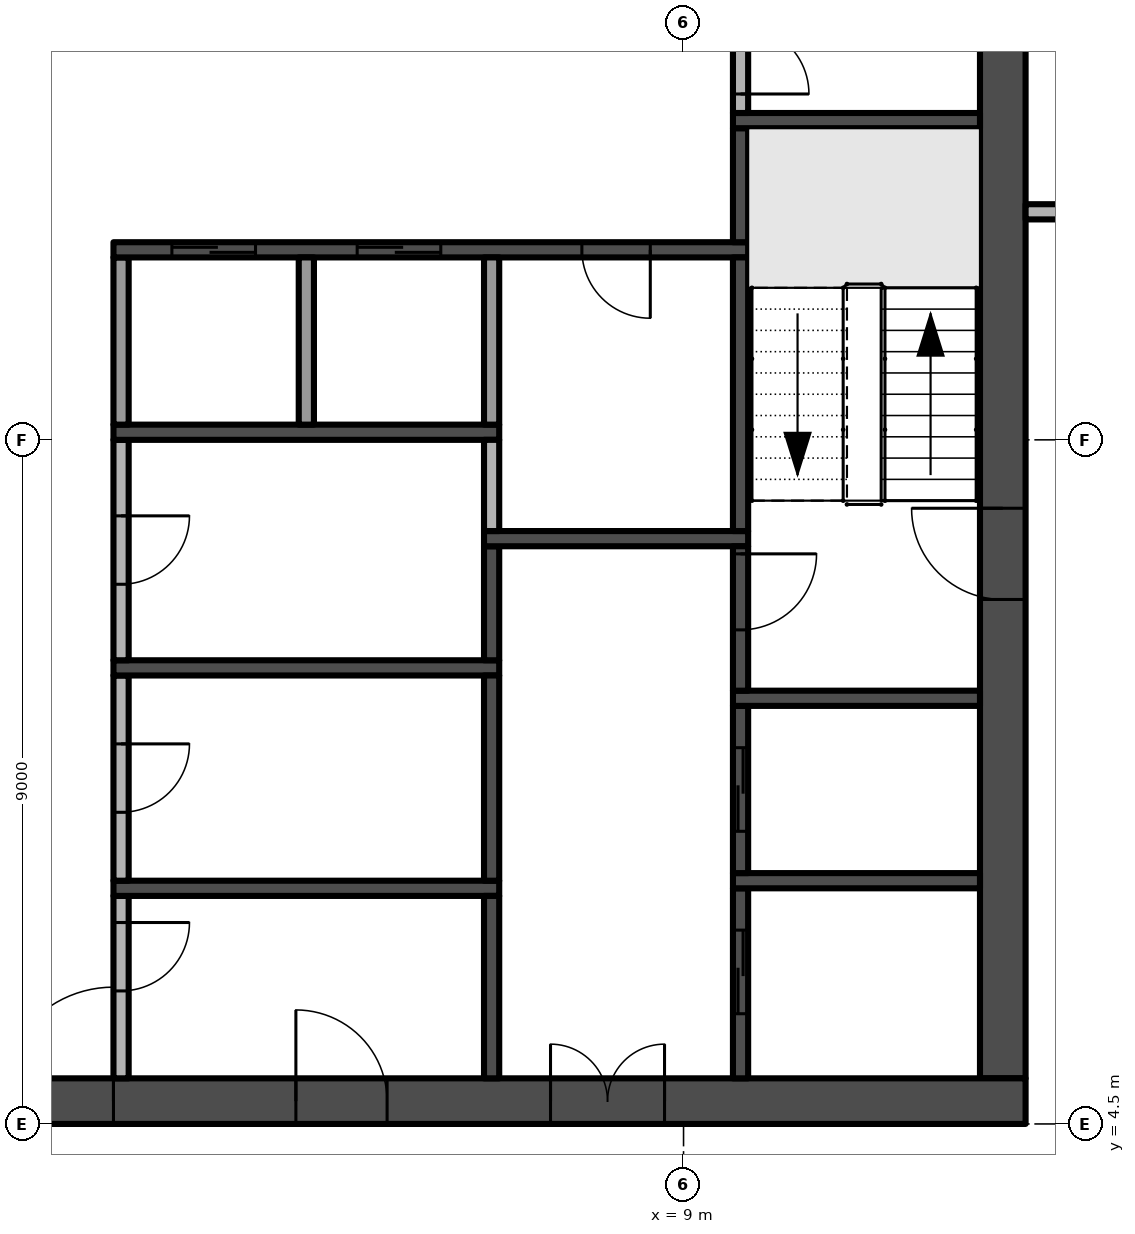
"""IFC4 building model, lengths in metres.
Left out: names, types, materials, properties, quantities, classifications, styles, units other than length and angle.
Written with IfcOpenShell. Run it as: python <this file> out.ifc"""

import sys

from ifc_helpers import new_model, si_unit, direction, frame, frame_2d, origin, place, context, subcontext, project, spatial, rectangle, extrude, element, fill, save


model = new_model("IFC4")
c1 = context("Model", 3, precision=1e-05, world=origin(), true_north=direction((0.0, 1.0)))
c2 = subcontext(c1, "Body", "Model", "MODEL_VIEW")
j1 = project(units=[si_unit("LENGTHUNIT", "METRE"), si_unit("PLANEANGLEUNIT", "RADIAN")], contexts=[c1])
p1 = place(None, origin())
s1 = spatial("IfcSite", under=j1, at=p1, CompositionType="ELEMENT")
p2 = place(p1, origin())
s2 = spatial("IfcBuilding", under=s1, at=p2, CompositionType="ELEMENT")
p3 = place(p2, frame((0.0, 0.0, 222.4)))
s3 = spatial("IfcBuildingStorey", under=s2, at=p3, CompositionType="ELEMENT", Elevation=222.4)
p4 = place(p3, frame((-13.5, 4.8, -0.3), z_axis=(0.0, 0.0, 1.0), x_axis=(1.0, 0.0, 0.0)))
e1 = element("IfcWall", 1, at=p4, inside=s3, PredefinedType="SHEAR", context=c2, shape_type="SweptSolid", body=[
    extrude(rectangle(XDim=27.0, YDim=0.6, at=frame_2d((13.5, 0.0))), origin(), (0.0, 0.0, 1.0), 3.8),
])
p5 = place(p4, frame((12.0, 0.0, 0.3)))
e2 = element("IfcOpeningElement", 2, at=p5, cuts=e1, PredefinedType="OPENING", context=c2, shape_type="SweptSolid", body=[
    extrude(rectangle(XDim=3.0, YDim=2.4, at=frame_2d((1.5, 1.2))), frame((0.0, 0.31, 0.0), z_axis=(0.0, -1.0, 0.0), x_axis=(1.0, 0.0, 0.0)), (0.0, 0.0, 1.0), 0.62),
])
p6 = place(p4, frame((4.9, 0.0, 0.3)))
e3 = element("IfcOpeningElement", 3, at=p6, cuts=e1, PredefinedType="OPENING", context=c2, shape_type="SweptSolid", body=[
    extrude(rectangle(XDim=1.2, YDim=2.2, at=frame_2d((0.6, 1.1))), frame((0.0, 0.31, 0.0), z_axis=(0.0, -1.0, 0.0), x_axis=(1.0, 0.0, 0.0)), (0.0, 0.0, 1.0), 0.62),
])
p7 = place(p4, frame((20.75, 0.0, 0.3)))
e4 = element("IfcOpeningElement", 4, at=p7, cuts=e1, PredefinedType="OPENING", context=c2, shape_type="SweptSolid", body=[
    extrude(rectangle(XDim=1.5, YDim=2.2, at=frame_2d((0.75, 1.1))), frame((0.0, 0.31, 0.0), z_axis=(0.0, -1.0, 0.0), x_axis=(1.0, 0.0, 0.0)), (0.0, 0.0, 1.0), 0.62),
])
p8 = place(p4, frame((17.4, 0.0, 0.3)))
e5 = element("IfcOpeningElement", 5, at=p8, cuts=e1, PredefinedType="OPENING", context=c2, shape_type="SweptSolid", body=[
    extrude(rectangle(XDim=1.2, YDim=2.2, at=frame_2d((0.6, 1.1))), frame((0.0, 0.31, 0.0), z_axis=(0.0, -1.0, 0.0), x_axis=(1.0, 0.0, 0.0)), (0.0, 0.0, 1.0), 0.62),
])
p9 = place(p3, frame((13.2, 5.1, -0.3), z_axis=(0.0, 0.0, 1.0), x_axis=(0.0, 1.0, 0.0)))
e6 = element("IfcWall", 6, at=p9, inside=s3, PredefinedType="SHEAR", context=c2, shape_type="SweptSolid", body=[
    extrude(rectangle(XDim=16.8, YDim=0.6, at=frame_2d((8.4, 0.0))), origin(), (0.0, 0.0, 1.0), 3.8),
])
p10 = place(p9, frame((6.3, 0.0, 0.3)))
e7 = element("IfcOpeningElement", 7, at=p10, cuts=e6, PredefinedType="OPENING", context=c2, shape_type="SweptSolid", body=[
    extrude(rectangle(XDim=1.2, YDim=2.2, at=frame_2d((0.6, 1.1))), frame((0.0, 0.31, 0.0), z_axis=(0.0, -1.0, 0.0), x_axis=(1.0, 0.0, 0.0)), (0.0, 0.0, 1.0), 0.62),
])
p11 = place(p3, frame((1.6, 7.5, 0.0), z_axis=(0.0, 0.0, 1.0), x_axis=(0.0, -1.0, 0.0)))
e8 = element("IfcWall", 8, at=p11, inside=s3, PredefinedType="PARTITIONING", context=c2, shape_type="SweptSolid", body=[
    extrude(rectangle(XDim=2.4, YDim=0.2, at=frame_2d((1.2, 0.0))), origin(), (0.0, 0.0, 1.0), 3.5),
])
p12 = place(p11, frame((0.35, 0.0, 0.0)))
e9 = element("IfcOpeningElement", 9, at=p12, cuts=e8, PredefinedType="OPENING", context=c2, shape_type="SweptSolid", body=[
    extrude(rectangle(XDim=0.9, YDim=2.1, at=frame_2d((0.45, 1.05))), frame((0.0, 0.11, 0.0), z_axis=(0.0, -1.0, 0.0), x_axis=(1.0, 0.0, 0.0)), (0.0, 0.0, 1.0), 0.22),
])
p13 = place(p3, frame((1.5, 7.6, 0.0), z_axis=(0.0, 0.0, 1.0), x_axis=(1.0, 0.0, 0.0)))
e10 = element("IfcWall", 10, at=p13, inside=s3, PredefinedType="SHEAR", context=c2, shape_type="SweptSolid", body=[
    extrude(rectangle(XDim=5.075, YDim=0.2, at=frame_2d((2.538, 0.0))), origin(), (0.0, 0.0, 1.0), 3.5),
])
p14 = place(p3, frame((1.6, 10.4, 0.0), z_axis=(0.0, 0.0, 1.0), x_axis=(0.0, -1.0, 0.0)))
e11 = element("IfcWall", 11, at=p14, inside=s3, PredefinedType="PARTITIONING", context=c2, shape_type="SweptSolid", body=[
    extrude(rectangle(XDim=2.7, YDim=0.2, at=frame_2d((1.35, 0.0))), origin(), (0.0, 0.0, 1.0), 3.5),
])
p15 = place(p14, frame((0.9, 0.0, 0.0)))
e12 = element("IfcOpeningElement", 12, at=p15, cuts=e11, PredefinedType="OPENING", context=c2, shape_type="SweptSolid", body=[
    extrude(rectangle(XDim=0.9, YDim=2.1, at=frame_2d((0.45, 1.05))), frame((0.0, 0.11, 0.0), z_axis=(0.0, -1.0, 0.0), x_axis=(1.0, 0.0, 0.0)), (0.0, 0.0, 1.0), 0.22),
])
p16 = place(p3, frame((1.5, 10.5, 0.0), z_axis=(0.0, 0.0, 1.0), x_axis=(1.0, 0.0, 0.0)))
e13 = element("IfcWall", 13, at=p16, inside=s3, PredefinedType="SHEAR", context=c2, shape_type="SweptSolid", body=[
    extrude(rectangle(XDim=5.075, YDim=0.2, at=frame_2d((2.538, 0.0))), origin(), (0.0, 0.0, 1.0), 3.5),
])
p17 = place(p3, frame((1.6, 13.5, 0.0), z_axis=(0.0, 0.0, 1.0), x_axis=(0.0, -1.0, 0.0)))
e14 = element("IfcWall", 14, at=p17, inside=s3, PredefinedType="PARTITIONING", context=c2, shape_type="SweptSolid", body=[
    extrude(rectangle(XDim=2.9, YDim=0.2, at=frame_2d((1.45, 0.0))), origin(), (0.0, 0.0, 1.0), 3.5),
])
p18 = place(p17, frame((1.0, 0.0, 0.0)))
e15 = element("IfcOpeningElement", 15, at=p18, cuts=e14, PredefinedType="OPENING", context=c2, shape_type="SweptSolid", body=[
    extrude(rectangle(XDim=0.9, YDim=2.1, at=frame_2d((0.45, 1.05))), frame((0.0, 0.11, 0.0), z_axis=(0.0, -1.0, 0.0), x_axis=(1.0, 0.0, 0.0)), (0.0, 0.0, 1.0), 0.22),
])
p19 = place(p3, frame((1.5, 13.6, 0.0), z_axis=(0.0, 0.0, 1.0), x_axis=(1.0, 0.0, 0.0)))
e16 = element("IfcWall", 16, at=p19, inside=s3, PredefinedType="SHEAR", context=c2, shape_type="SweptSolid", body=[
    extrude(rectangle(XDim=5.075, YDim=0.2, at=frame_2d((2.538, 0.0))), origin(), (0.0, 0.0, 1.0), 3.5),
])
p20 = place(p3, frame((1.6, 13.7, 0.0), z_axis=(0.0, 0.0, 1.0), x_axis=(0.0, 1.0, 0.0)))
e17 = element("IfcWall", 17, at=p20, inside=s3, PredefinedType="PARTITIONING", context=c2, shape_type="SweptSolid", body=[
    extrude(rectangle(XDim=2.2, YDim=0.2, at=frame_2d((1.1, 0.0))), origin(), (0.0, 0.0, 1.0), 3.5),
])
p21 = place(p3, frame((9.85, 16.0, 0.0), z_axis=(0.0, 0.0, 1.0), x_axis=(-1.0, 0.0, 0.0)))
e18 = element("IfcWall", 18, at=p21, inside=s3, PredefinedType="SHEAR", context=c2, shape_type="SweptSolid", body=[
    extrude(rectangle(XDim=8.35, YDim=0.2, at=frame_2d((4.175, 0.0))), origin(), (0.0, 0.0, 1.0), 3.5),
])
p22 = place(p21, frame((6.481, 0.0, 0.0)))
e19 = element("IfcOpeningElement", 19, at=p22, cuts=e18, PredefinedType="OPENING", context=c2, shape_type="SweptSolid", body=[
    extrude(rectangle(XDim=1.1, YDim=2.1, at=frame_2d((0.55, 1.05))), frame((0.0, 0.11, 0.0), z_axis=(0.0, -1.0, 0.0), x_axis=(1.0, 0.0, 0.0)), (0.0, 0.0, 1.0), 0.22),
])
p23 = place(p21, frame((4.044, 0.0, 0.0)))
e20 = element("IfcOpeningElement", 20, at=p23, cuts=e18, PredefinedType="OPENING", context=c2, shape_type="SweptSolid", body=[
    extrude(rectangle(XDim=1.1, YDim=2.1, at=frame_2d((0.55, 1.05))), frame((0.0, 0.11, 0.0), z_axis=(0.0, -1.0, 0.0), x_axis=(1.0, 0.0, 0.0)), (0.0, 0.0, 1.0), 0.22),
])
p24 = place(p21, frame((1.288, 0.0, 0.0)))
e21 = element("IfcOpeningElement", 21, at=p24, cuts=e18, PredefinedType="OPENING", context=c2, shape_type="SweptSolid", body=[
    extrude(rectangle(XDim=0.9, YDim=2.1, at=frame_2d((0.45, 1.05))), frame((0.0, 0.11, 0.0), z_axis=(0.0, -1.0, 0.0), x_axis=(1.0, 0.0, 0.0)), (0.0, 0.0, 1.0), 0.22),
])
p25 = place(p3, frame((4.037, 13.7, 0.0), z_axis=(0.0, 0.0, 1.0), x_axis=(0.0, 1.0, 0.0)))
e22 = element("IfcWall", 22, at=p25, inside=s3, PredefinedType="PARTITIONING", context=c2, shape_type="SweptSolid", body=[
    extrude(rectangle(XDim=2.2, YDim=0.2, at=frame_2d((1.1, 0.0))), origin(), (0.0, 0.0, 1.0), 3.5),
])
p26 = place(p3, frame((6.475, 5.1, 0.0), z_axis=(0.0, 0.0, 1.0), x_axis=(0.0, 1.0, 0.0)))
e23 = element("IfcWall", 23, at=p26, inside=s3, PredefinedType="SHEAR", context=c2, shape_type="SweptSolid", body=[
    extrude(rectangle(XDim=2.4, YDim=0.2, at=frame_2d((1.2, 0.0))), origin(), (0.0, 0.0, 1.0), 3.5),
])
p27 = place(p3, frame((6.475, 7.7, 0.0), z_axis=(0.0, 0.0, 1.0), x_axis=(0.0, 1.0, 0.0)))
e24 = element("IfcWall", 24, at=p27, inside=s3, PredefinedType="SHEAR", context=c2, shape_type="SweptSolid", body=[
    extrude(rectangle(XDim=2.7, YDim=0.2, at=frame_2d((1.35, 0.0))), origin(), (0.0, 0.0, 1.0), 3.5),
])
p28 = place(p3, frame((6.475, 10.6, 0.0), z_axis=(0.0, 0.0, 1.0), x_axis=(0.0, 1.0, 0.0)))
e25 = element("IfcWall", 25, at=p28, inside=s3, PredefinedType="SHEAR", context=c2, shape_type="SweptSolid", body=[
    extrude(rectangle(XDim=1.5, YDim=0.2, at=frame_2d((0.75, 0.0))), origin(), (0.0, 0.0, 1.0), 3.5),
])
p29 = place(p3, frame((6.375, 12.2, 0.0), z_axis=(0.0, 0.0, 1.0), x_axis=(1.0, 0.0, 0.0)))
e26 = element("IfcWall", 26, at=p29, inside=s3, PredefinedType="SHEAR", context=c2, shape_type="SweptSolid", body=[
    extrude(rectangle(XDim=3.475, YDim=0.2, at=frame_2d((1.738, 0.0))), origin(), (0.0, 0.0, 1.0), 3.5),
])
p30 = place(p3, frame((6.475, 12.3, 0.0), z_axis=(0.0, 0.0, 1.0), x_axis=(0.0, 1.0, 0.0)))
e27 = element("IfcWall", 27, at=p30, inside=s3, PredefinedType="PARTITIONING", context=c2, shape_type="SweptSolid", body=[
    extrude(rectangle(XDim=1.2, YDim=0.2, at=frame_2d((0.6, 0.0))), origin(), (0.0, 0.0, 1.0), 3.5),
])
p31 = place(p3, frame((6.475, 13.7, 0.0), z_axis=(0.0, 0.0, 1.0), x_axis=(0.0, 1.0, 0.0)))
e28 = element("IfcWall", 28, at=p31, inside=s3, PredefinedType="PARTITIONING", context=c2, shape_type="SweptSolid", body=[
    extrude(rectangle(XDim=2.2, YDim=0.2, at=frame_2d((1.1, 0.0))), origin(), (0.0, 0.0, 1.0), 3.5),
])
p32 = place(p3, frame((9.75, 5.1, 0.0), z_axis=(0.0, 0.0, 1.0), x_axis=(0.0, 1.0, 0.0)))
e29 = element("IfcWall", 29, at=p32, inside=s3, PredefinedType="SHEAR", context=c2, shape_type="SweptSolid", body=[
    extrude(rectangle(XDim=2.5, YDim=0.2, at=frame_2d((1.25, 0.0))), origin(), (0.0, 0.0, 1.0), 3.5),
])
p33 = place(p32, frame((0.85, 0.0, 0.0)))
e30 = element("IfcOpeningElement", 30, at=p33, cuts=e29, PredefinedType="OPENING", context=c2, shape_type="SweptSolid", body=[
    extrude(rectangle(XDim=1.1, YDim=2.1, at=frame_2d((0.55, 1.05))), frame((0.0, 0.11, 0.0), z_axis=(0.0, -1.0, 0.0), x_axis=(1.0, 0.0, 0.0)), (0.0, 0.0, 1.0), 0.22),
])
p34 = place(p3, frame((9.65, 7.7, 0.0), z_axis=(0.0, 0.0, 1.0), x_axis=(1.0, 0.0, 0.0)))
e31 = element("IfcWall", 31, at=p34, inside=s3, PredefinedType="SHEAR", context=c2, shape_type="SweptSolid", body=[
    extrude(rectangle(XDim=3.25, YDim=0.2, at=frame_2d((1.625, 0.0))), origin(), (0.0, 0.0, 1.0), 3.5),
])
p35 = place(p3, frame((9.75, 7.8, 0.0), z_axis=(0.0, 0.0, 1.0), x_axis=(0.0, 1.0, 0.0)))
e32 = element("IfcWall", 32, at=p35, inside=s3, PredefinedType="SHEAR", context=c2, shape_type="SweptSolid", body=[
    extrude(rectangle(XDim=2.2, YDim=0.2, at=frame_2d((1.1, 0.0))), origin(), (0.0, 0.0, 1.0), 3.5),
])
p36 = place(p35, frame((0.55, 0.0, 0.0)))
e33 = element("IfcOpeningElement", 33, at=p36, cuts=e32, PredefinedType="OPENING", context=c2, shape_type="SweptSolid", body=[
    extrude(rectangle(XDim=1.1, YDim=2.1, at=frame_2d((0.55, 1.05))), frame((0.0, 0.11, 0.0), z_axis=(0.0, -1.0, 0.0), x_axis=(1.0, 0.0, 0.0)), (0.0, 0.0, 1.0), 0.22),
])
p37 = place(p3, frame((9.65, 10.1, 0.0), z_axis=(0.0, 0.0, 1.0), x_axis=(1.0, 0.0, 0.0)))
e34 = element("IfcWall", 34, at=p37, inside=s3, PredefinedType="SHEAR", context=c2, shape_type="SweptSolid", body=[
    extrude(rectangle(XDim=3.25, YDim=0.2, at=frame_2d((1.625, 0.0))), origin(), (0.0, 0.0, 1.0), 3.5),
])
p38 = place(p3, frame((9.75, 12.1, 0.0), z_axis=(0.0, 0.0, 1.0), x_axis=(0.0, -1.0, 0.0)))
e35 = element("IfcWall", 35, at=p38, inside=s3, PredefinedType="SHEAR", context=c2, shape_type="SweptSolid", body=[
    extrude(rectangle(XDim=1.9, YDim=0.2, at=frame_2d((0.95, 0.0))), origin(), (0.0, 0.0, 1.0), 3.5),
])
p39 = place(p38, frame((0.1, 0.0, 0.0)))
e36 = element("IfcOpeningElement", 36, at=p39, cuts=e35, PredefinedType="OPENING", context=c2, shape_type="SweptSolid", body=[
    extrude(rectangle(XDim=1.0, YDim=2.2, at=frame_2d((0.5, 1.1))), frame((0.0, 0.11, 0.0), z_axis=(0.0, -1.0, 0.0), x_axis=(1.0, 0.0, 0.0)), (0.0, 0.0, 1.0), 0.22),
])
p40 = place(p3, frame((9.75, 12.3, 0.0), z_axis=(0.0, 0.0, 1.0), x_axis=(0.0, 1.0, 0.0)))
e37 = element("IfcWall", 37, at=p40, inside=s3, PredefinedType="SHEAR", context=c2, shape_type="SweptSolid", body=[
    extrude(rectangle(XDim=3.6, YDim=0.2, at=frame_2d((1.8, 0.0))), origin(), (0.0, 0.0, 1.0), 3.5),
])
p41 = place(p3, frame((9.75, 16.1, 0.0), z_axis=(0.0, 0.0, 1.0), x_axis=(0.0, 1.0, 0.0)))
e38 = element("IfcWall", 38, at=p41, inside=s3, PredefinedType="SHEAR", context=c2, shape_type="SweptSolid", body=[
    extrude(rectangle(XDim=1.5, YDim=0.2, at=frame_2d((0.75, 0.0))), origin(), (0.0, 0.0, 1.0), 3.5),
])
p42 = place(p3, frame((9.65, 17.7, 0.0), z_axis=(0.0, 0.0, 1.0), x_axis=(1.0, 0.0, 0.0)))
e39 = element("IfcWall", 39, at=p42, inside=s3, PredefinedType="SHEAR", context=c2, shape_type="SweptSolid", body=[
    extrude(rectangle(XDim=3.25, YDim=0.2, at=frame_2d((1.625, 0.0))), origin(), (0.0, 0.0, 1.0), 3.5),
])
p43 = place(p3, frame((9.75, 19.2, 0.0), z_axis=(0.0, 0.0, 1.0), x_axis=(0.0, -1.0, 0.0)))
e40 = element("IfcWall", 40, at=p43, inside=s3, PredefinedType="PARTITIONING", context=c2, shape_type="SweptSolid", body=[
    extrude(rectangle(XDim=1.4, YDim=0.2, at=frame_2d((0.7, 0.0))), origin(), (0.0, 0.0, 1.0), 3.5),
])
p44 = place(p43, frame((0.25, 0.0, 0.0)))
e41 = element("IfcOpeningElement", 41, at=p44, cuts=e40, PredefinedType="OPENING", context=c2, shape_type="SweptSolid", body=[
    extrude(rectangle(XDim=0.9, YDim=2.1, at=frame_2d((0.45, 1.05))), frame((0.0, 0.11, 0.0), z_axis=(0.0, -1.0, 0.0), x_axis=(1.0, 0.0, 0.0)), (0.0, 0.0, 1.0), 0.22),
])
p45 = place(p3, frame((13.5, 16.5, 0.0), z_axis=(0.0, 0.0, 1.0), x_axis=(1.0, 0.0, 0.0)))
e42 = element("IfcWall", 42, at=p45, inside=s3, PredefinedType="PARTITIONING", context=c2, shape_type="SweptSolid", body=[
    extrude(rectangle(XDim=3.825, YDim=0.2, at=frame_2d((1.913, 0.0))), origin(), (0.0, 0.0, 1.0), 3.5),
])
p46 = place(p45, frame((1.55, 0.0, 0.0)))
e43 = element("IfcOpeningElement", 43, at=p46, cuts=e42, PredefinedType="OPENING", context=c2, shape_type="SweptSolid", body=[
    extrude(rectangle(XDim=0.9, YDim=2.1, at=frame_2d((0.45, 1.05))), frame((0.0, 0.11, 0.0), z_axis=(0.0, -1.0, 0.0), x_axis=(1.0, 0.0, 0.0)), (0.0, 0.0, 1.0), 0.22),
])
p47 = place(p5, frame((3.0, 0.0, 0.0), z_axis=(0.0, 0.0, 1.0), x_axis=(-1.0, 0.0, 0.0)))
e44 = element("IfcDoor", 44, at=p47, inside=s3, OperationType="DOUBLE_DOOR_SINGLE_SWING", PredefinedType="DOOR", context=c2, shape_type="SweptSolid", body=[
    extrude(rectangle(XDim=3.0, YDim=2.4, at=frame_2d((1.5, 1.2))), frame((0.0, 0.025, 0.0), z_axis=(0.0, -1.0, 0.0), x_axis=(1.0, 0.0, 0.0)), (0.0, 0.0, 1.0), 0.05),
])
fill(e2, e44)
p48 = place(p10, frame((1.2, 0.0, 0.0), z_axis=(0.0, 0.0, 1.0), x_axis=(-1.0, 0.0, 0.0)))
e45 = element("IfcDoor", 45, at=p48, inside=s3, OperationType="SINGLE_SWING_LEFT", PredefinedType="DOOR", context=c2, shape_type="SweptSolid", body=[
    extrude(rectangle(XDim=1.2, YDim=2.2, at=frame_2d((0.6, 1.1))), frame((0.0, 0.025, 0.0), z_axis=(0.0, -1.0, 0.0), x_axis=(1.0, 0.0, 0.0)), (0.0, 0.0, 1.0), 0.05),
])
fill(e7, e45)
p49 = place(p7, frame((1.5, 0.0, 0.0), z_axis=(0.0, 0.0, 1.0), x_axis=(-1.0, 0.0, 0.0)))
e46 = element("IfcDoor", 46, at=p49, inside=s3, OperationType="DOUBLE_DOOR_SINGLE_SWING", PredefinedType="DOOR", context=c2, shape_type="SweptSolid", body=[
    extrude(rectangle(XDim=1.5, YDim=2.2, at=frame_2d((0.75, 1.1))), frame((0.0, 0.025, 0.0), z_axis=(0.0, -1.0, 0.0), x_axis=(1.0, 0.0, 0.0)), (0.0, 0.0, 1.0), 0.05),
])
fill(e4, e46)
p50 = place(p8, frame((1.2, 0.0, 0.0), z_axis=(0.0, 0.0, 1.0), x_axis=(-1.0, 0.0, 0.0)))
e47 = element("IfcDoor", 47, at=p50, inside=s3, OperationType="SINGLE_SWING_RIGHT", PredefinedType="DOOR", context=c2, shape_type="SweptSolid", body=[
    extrude(rectangle(XDim=1.2, YDim=2.2, at=frame_2d((0.6, 1.1))), frame((0.0, 0.025, 0.0), z_axis=(0.0, -1.0, 0.0), x_axis=(1.0, 0.0, 0.0)), (0.0, 0.0, 1.0), 0.05),
])
fill(e5, e47)
p51 = place(p39, origin())
e48 = element("IfcDoor", 48, at=p51, inside=s3, OperationType="SINGLE_SWING_LEFT", PredefinedType="DOOR", context=c2, shape_type="SweptSolid", body=[
    extrude(rectangle(XDim=1.0, YDim=2.2, at=frame_2d((0.5, 1.1))), frame((0.0, 0.025, 0.0), z_axis=(0.0, -1.0, 0.0), x_axis=(1.0, 0.0, 0.0)), (0.0, 0.0, 1.0), 0.05),
])
fill(e36, e48)
p52 = place(p22, origin())
e49 = element("IfcDoor", 49, at=p52, inside=s3, OperationType="SLIDING_TO_RIGHT", PredefinedType="DOOR", context=c2, shape_type="SweptSolid", body=[
    extrude(rectangle(XDim=1.1, YDim=2.1, at=frame_2d((0.55, 1.05))), frame((0.0, 0.025, 0.0), z_axis=(0.0, -1.0, 0.0), x_axis=(1.0, 0.0, 0.0)), (0.0, 0.0, 1.0), 0.05),
])
fill(e19, e49)
p53 = place(p23, origin())
e50 = element("IfcDoor", 50, at=p53, inside=s3, OperationType="SLIDING_TO_RIGHT", PredefinedType="DOOR", context=c2, shape_type="SweptSolid", body=[
    extrude(rectangle(XDim=1.1, YDim=2.1, at=frame_2d((0.55, 1.05))), frame((0.0, 0.025, 0.0), z_axis=(0.0, -1.0, 0.0), x_axis=(1.0, 0.0, 0.0)), (0.0, 0.0, 1.0), 0.05),
])
fill(e20, e50)
p54 = place(p33, origin())
e51 = element("IfcDoor", 51, at=p54, inside=s3, OperationType="SLIDING_TO_RIGHT", PredefinedType="DOOR", context=c2, shape_type="SweptSolid", body=[
    extrude(rectangle(XDim=1.1, YDim=2.1, at=frame_2d((0.55, 1.05))), frame((0.0, 0.025, 0.0), z_axis=(0.0, -1.0, 0.0), x_axis=(1.0, 0.0, 0.0)), (0.0, 0.0, 1.0), 0.05),
])
fill(e30, e51)
p55 = place(p36, origin())
e52 = element("IfcDoor", 52, at=p55, inside=s3, OperationType="SLIDING_TO_RIGHT", PredefinedType="DOOR", context=c2, shape_type="SweptSolid", body=[
    extrude(rectangle(XDim=1.1, YDim=2.1, at=frame_2d((0.55, 1.05))), frame((0.0, 0.025, 0.0), z_axis=(0.0, -1.0, 0.0), x_axis=(1.0, 0.0, 0.0)), (0.0, 0.0, 1.0), 0.05),
])
fill(e33, e52)
p56 = place(p12, origin())
e53 = element("IfcDoor", 53, at=p56, inside=s3, OperationType="SINGLE_SWING_LEFT", PredefinedType="DOOR", context=c2, shape_type="SweptSolid", body=[
    extrude(rectangle(XDim=0.9, YDim=2.1, at=frame_2d((0.45, 1.05))), frame((0.0, 0.025, 0.0), z_axis=(0.0, -1.0, 0.0), x_axis=(1.0, 0.0, 0.0)), (0.0, 0.0, 1.0), 0.05),
])
fill(e9, e53)
p57 = place(p15, origin())
e54 = element("IfcDoor", 54, at=p57, inside=s3, OperationType="SINGLE_SWING_LEFT", PredefinedType="DOOR", context=c2, shape_type="SweptSolid", body=[
    extrude(rectangle(XDim=0.9, YDim=2.1, at=frame_2d((0.45, 1.05))), frame((0.0, 0.025, 0.0), z_axis=(0.0, -1.0, 0.0), x_axis=(1.0, 0.0, 0.0)), (0.0, 0.0, 1.0), 0.05),
])
fill(e12, e54)
p58 = place(p18, origin())
e55 = element("IfcDoor", 55, at=p58, inside=s3, OperationType="SINGLE_SWING_LEFT", PredefinedType="DOOR", context=c2, shape_type="SweptSolid", body=[
    extrude(rectangle(XDim=0.9, YDim=2.1, at=frame_2d((0.45, 1.05))), frame((0.0, 0.025, 0.0), z_axis=(0.0, -1.0, 0.0), x_axis=(1.0, 0.0, 0.0)), (0.0, 0.0, 1.0), 0.05),
])
fill(e15, e55)
p59 = place(p24, origin())
e56 = element("IfcDoor", 56, at=p59, inside=s3, OperationType="SINGLE_SWING_LEFT", PredefinedType="DOOR", context=c2, shape_type="SweptSolid", body=[
    extrude(rectangle(XDim=0.9, YDim=2.1, at=frame_2d((0.45, 1.05))), frame((0.0, 0.025, 0.0), z_axis=(0.0, -1.0, 0.0), x_axis=(1.0, 0.0, 0.0)), (0.0, 0.0, 1.0), 0.05),
])
fill(e21, e56)
p60 = place(p44, origin())
e57 = element("IfcDoor", 57, at=p60, inside=s3, OperationType="SINGLE_SWING_RIGHT", PredefinedType="DOOR", context=c2, shape_type="SweptSolid", body=[
    extrude(rectangle(XDim=0.9, YDim=2.1, at=frame_2d((0.45, 1.05))), frame((0.0, 0.025, 0.0), z_axis=(0.0, -1.0, 0.0), x_axis=(1.0, 0.0, 0.0)), (0.0, 0.0, 1.0), 0.05),
])
fill(e41, e57)
save(model, sys.argv[1])
